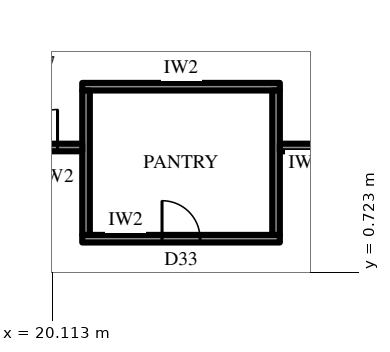
"""IFC4 building model, lengths in metres.
Left out: names, types, materials, properties, quantities, classifications, styles, units other than length and angle.
Written with IfcOpenShell. Run it as: python <this file> out.ifc"""

import sys

from ifc_helpers import new_model, si_unit, direction, frame, frame_2d, origin, place, context, subcontext, project, spatial, rectangle, extrude, element, fill, save


model = new_model("IFC4")
c1 = context("Model", 3, precision=1e-05, world=origin(), true_north=direction((0.0, 1.0)))
c2 = subcontext(c1, "Body", "Model", "MODEL_VIEW")
j1 = project(units=[si_unit("LENGTHUNIT", "METRE"), si_unit("PLANEANGLEUNIT", "RADIAN")], contexts=[c1])
p1 = place(None, origin())
s1 = spatial("IfcSite", under=j1, at=p1, CompositionType="ELEMENT")
p2 = place(p1, origin())
s2 = spatial("IfcBuilding", under=s1, at=p2, CompositionType="ELEMENT")
p3 = place(p2, frame((0.0, 0.0, 127.9)))
s3 = spatial("IfcBuildingStorey", under=s2, at=p3, CompositionType="ELEMENT", Elevation=127.9)
p4 = place(p3, frame((20.9, 1.6, 0.0), z_axis=(0.0, 0.0, 1.0), x_axis=(1.0, 0.0, 0.0)))
e1 = element("IfcWall", 1, at=p4, inside=s3, PredefinedType="PARTITIONING", context=c2, shape_type="SweptSolid", body=[
    extrude(rectangle(XDim=5.2, YDim=0.2, at=frame_2d((2.6, 0.0))), origin(), (0.0, 0.0, 1.0), 4.0),
])
p5 = place(p4, frame((2.1, 0.0, 0.0)))
e2 = element("IfcOpeningElement", 2, at=p5, cuts=e1, PredefinedType="OPENING", context=c2, shape_type="SweptSolid", body=[
    extrude(rectangle(XDim=1.0, YDim=2.2, at=frame_2d((0.5, 1.1))), frame((0.0, 0.11, 0.0), z_axis=(0.0, -1.0, 0.0), x_axis=(1.0, 0.0, 0.0)), (0.0, 0.0, 1.0), 0.22),
])
p6 = place(p3, frame((20.9, 5.6, 0.0), z_axis=(0.0, 0.0, 1.0), x_axis=(1.0, 0.0, 0.0)))
e3 = element("IfcWall", 3, at=p6, inside=s3, PredefinedType="PARTITIONING", context=c2, shape_type="SweptSolid", body=[
    extrude(rectangle(XDim=5.2, YDim=0.2, at=frame_2d((2.6, 0.0))), origin(), (0.0, 0.0, 1.0), 4.0),
])
for number, where, z_axis, x_axis in (
    (4, (21.0, 1.7, 0.0), (0.0, 0.0, 1.0), (0.0, 1.0, 0.0)),
    (5, (26.0, 1.7, 0.0), (0.0, 0.0, 1.0), (0.0, 1.0, 0.0)),
):
    element("IfcWall", number, at=place(p3, frame(where, z_axis=z_axis, x_axis=x_axis)), inside=s3, PredefinedType="PARTITIONING", context=c2, shape_type="SweptSolid", body=[
        extrude(rectangle(XDim=3.8, YDim=0.2, at=frame_2d((1.9, 0.0))), origin(), (0.0, 0.0, 1.0), 4.0),
    ])
p7 = place(p3, frame((18.6, 4.0, 0.0), z_axis=(0.0, 0.0, 1.0), x_axis=(1.0, 0.0, 0.0)))
e6 = element("IfcWall", 6, at=p7, inside=s3, PredefinedType="PARTITIONING", context=c2, shape_type="SweptSolid", body=[
    extrude(rectangle(XDim=2.3, YDim=0.2, at=frame_2d((1.15, 0.0))), origin(), (0.0, 0.0, 1.0), 4.0),
])
p8 = place(p7, frame((0.65, 0.0, 0.0)))
e7 = element("IfcOpeningElement", 7, at=p8, cuts=e6, PredefinedType="OPENING", context=c2, shape_type="SweptSolid", body=[
    extrude(rectangle(XDim=1.0, YDim=2.2, at=frame_2d((0.5, 1.1))), frame((0.0, 0.11, 0.0), z_axis=(0.0, -1.0, 0.0), x_axis=(1.0, 0.0, 0.0)), (0.0, 0.0, 1.0), 0.22),
])
p9 = place(p3, frame((26.1, 4.0, 0.0), z_axis=(0.0, 0.0, 1.0), x_axis=(1.0, 0.0, 0.0)))
e8 = element("IfcWall", 8, at=p9, inside=s3, PredefinedType="PARTITIONING", context=c2, shape_type="SweptSolid", body=[
    extrude(rectangle(XDim=7.709, YDim=0.2, at=frame_2d((3.855, 0.0))), origin(), (0.0, 0.0, 1.0), 4.0),
])
p10 = place(p5, origin())
e9 = element("IfcDoor", 9, at=p10, inside=s3, OperationType="SINGLE_SWING_RIGHT", PredefinedType="DOOR", context=c2, shape_type="SweptSolid", body=[
    extrude(rectangle(XDim=1.0, YDim=2.2, at=frame_2d((0.5, 1.1))), frame((0.0, 0.025, 0.0), z_axis=(0.0, -1.0, 0.0), x_axis=(1.0, 0.0, 0.0)), (0.0, 0.0, 1.0), 0.05),
])
fill(e2, e9)
p11 = place(p8, origin())
e10 = element("IfcDoor", 10, at=p11, inside=s3, OperationType="SINGLE_SWING_LEFT", PredefinedType="DOOR", context=c2, shape_type="SweptSolid", body=[
    extrude(rectangle(XDim=1.0, YDim=2.2, at=frame_2d((0.5, 1.1))), frame((0.0, 0.025, 0.0), z_axis=(0.0, -1.0, 0.0), x_axis=(1.0, 0.0, 0.0)), (0.0, 0.0, 1.0), 0.05),
])
fill(e7, e10)
save(model, sys.argv[1])
